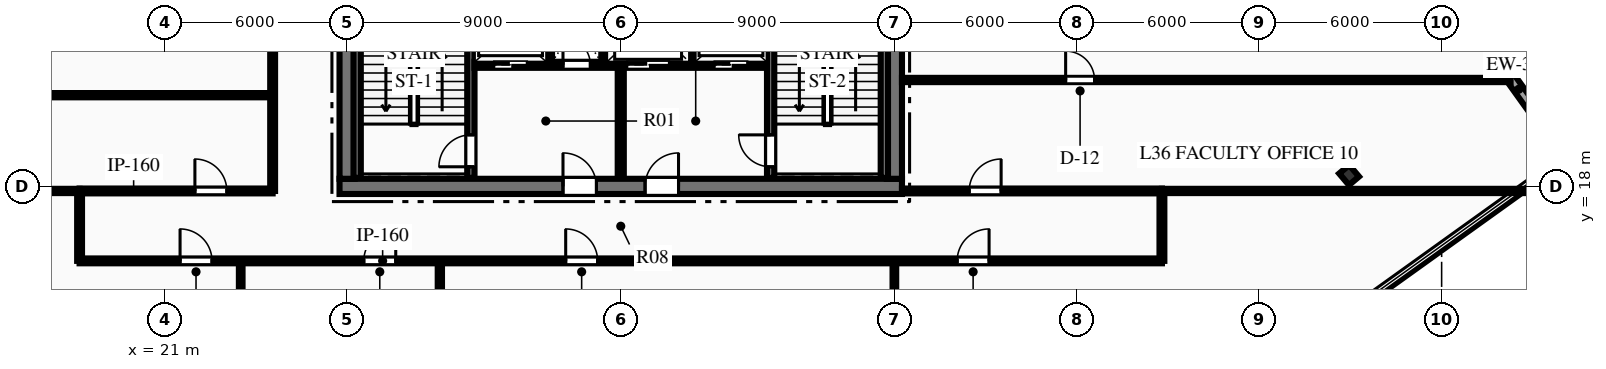
"""IFC4 building model, lengths in metres.
Left out: names, types, materials, properties, quantities, classifications, styles, units other than length and angle.
Written with IfcOpenShell. Run it as: python <this file> out.ifc"""

import sys

from ifc_helpers import new_model, si_unit, direction, frame, frame_2d, origin, origin_2d, place, context, subcontext, project, spatial, rectangle, i_section, extrude, element, fill, save


model = new_model("IFC4")
c1 = context("Model", 3, precision=1e-05, world=origin(), true_north=direction((0.0, 1.0)))
c2 = subcontext(c1, "Body", "Model", "MODEL_VIEW")
j1 = project(units=[si_unit("LENGTHUNIT", "METRE"), si_unit("PLANEANGLEUNIT", "RADIAN")], contexts=[c1])
p1 = place(None, origin())
s1 = spatial("IfcSite", under=j1, at=p1, CompositionType="ELEMENT")
p2 = place(p1, origin())
s2 = spatial("IfcBuilding", under=s1, at=p2, CompositionType="ELEMENT")
p3 = place(p2, frame((0.0, 0.0, 148.2)))
s3 = spatial("IfcBuildingStorey", under=s2, at=p3, CompositionType="ELEMENT", Elevation=148.2)
p4 = place(p3, frame((26.75, 18.0, 0.0), z_axis=(0.0, 0.0, 1.0), x_axis=(1.0, 0.0, 0.0)))
e1 = element("IfcWall", 1, at=p4, inside=s3, PredefinedType="SHEAR", context=c2, shape_type="SweptSolid", body=[
    extrude(rectangle(XDim=18.5, YDim=0.5, at=frame_2d((9.25, 0.0))), origin(), (0.0, 0.0, 1.0), 3.75),
])
p5 = place(p4, frame((7.35, 0.0, 0.0)))
e2 = element("IfcOpeningElement", 2, at=p5, cuts=e1, PredefinedType="OPENING", context=c2, shape_type="SweptSolid", body=[
    extrude(rectangle(XDim=1.1, YDim=2.15, at=frame_2d((0.55, 1.075))), frame((0.0, 0.26, 0.0), z_axis=(0.0, -1.0, 0.0), x_axis=(1.0, 0.0, 0.0)), (0.0, 0.0, 1.0), 0.52),
])
p6 = place(p4, frame((10.05, 0.0, 0.0)))
e3 = element("IfcOpeningElement", 3, at=p6, cuts=e1, PredefinedType="OPENING", context=c2, shape_type="SweptSolid", body=[
    extrude(rectangle(XDim=1.1, YDim=2.15, at=frame_2d((0.55, 1.075))), frame((0.0, 0.26, 0.0), z_axis=(0.0, -1.0, 0.0), x_axis=(1.0, 0.0, 0.0)), (0.0, 0.0, 1.0), 0.52),
])
p7 = place(p3, frame((27.0, 18.25, 0.0), z_axis=(0.0, 0.0, 1.0), x_axis=(0.0, 1.0, 0.0)))
e4 = element("IfcWall", 4, at=p7, inside=s3, PredefinedType="SHEAR", context=c2, shape_type="SweptSolid", body=[
    extrude(rectangle(XDim=15.5, YDim=0.5, at=frame_2d((7.75, 0.0))), origin(), (0.0, 0.0, 1.0), 3.75),
])
p8 = place(p7, frame((9.99, 0.0, 0.0)))
e5 = element("IfcOpeningElement", 5, at=p8, cuts=e4, PredefinedType="OPENING", context=c2, shape_type="SweptSolid", body=[
    extrude(rectangle(XDim=1.4, YDim=2.2, at=frame_2d((0.7, 1.1))), frame((0.0, 0.26, 0.0), z_axis=(0.0, -1.0, 0.0), x_axis=(1.0, 0.0, 0.0)), (0.0, 0.0, 1.0), 0.52),
])
p9 = place(p3, frame((45.0, 18.25, 0.0), z_axis=(0.0, 0.0, 1.0), x_axis=(0.0, 1.0, 0.0)))
e6 = element("IfcWall", 6, at=p9, inside=s3, PredefinedType="SHEAR", context=c2, shape_type="SweptSolid", body=[
    extrude(rectangle(XDim=15.5, YDim=0.5, at=frame_2d((7.75, 0.0))), origin(), (0.0, 0.0, 1.0), 3.75),
])
p10 = place(p9, frame((9.99, 0.0, 0.0)))
e7 = element("IfcOpeningElement", 7, at=p10, cuts=e6, PredefinedType="OPENING", context=c2, shape_type="SweptSolid", body=[
    extrude(rectangle(XDim=1.4, YDim=2.2, at=frame_2d((0.7, 1.1))), frame((0.0, 0.26, 0.0), z_axis=(0.0, -1.0, 0.0), x_axis=(1.0, 0.0, 0.0)), (0.0, 0.0, 1.0), 0.52),
])
p11 = place(p3, frame((31.07, 18.28, 0.0), z_axis=(0.0, 0.0, 1.0), x_axis=(0.0, 1.0, 0.0)))
e8 = element("IfcWall", 8, at=p11, inside=s3, PredefinedType="SHEAR", context=c2, shape_type="SweptSolid", body=[
    extrude(rectangle(XDim=8.26, YDim=0.24, at=frame_2d((4.13, 0.0))), origin(), (0.0, 0.0, 1.0), 3.75),
])
p12 = place(p11, frame((0.365, 0.0, 0.0)))
e9 = element("IfcOpeningElement", 9, at=p12, cuts=e8, PredefinedType="OPENING", context=c2, shape_type="SweptSolid", body=[
    extrude(rectangle(XDim=1.05, YDim=2.15, at=frame_2d((0.525, 1.075))), frame((0.0, 0.13, 0.0), z_axis=(0.0, -1.0, 0.0), x_axis=(1.0, 0.0, 0.0)), (0.0, 0.0, 1.0), 0.26),
])
p13 = place(p3, frame((27.33, 18.28, 0.0), z_axis=(0.0, 0.0, 1.0), x_axis=(0.0, 1.0, 0.0)))
e10 = element("IfcWall", 10, at=p13, inside=s3, PredefinedType="SHEAR", context=c2, shape_type="SweptSolid", body=[
    extrude(rectangle(XDim=8.26, YDim=0.24, at=frame_2d((4.13, 0.0))), origin(), (0.0, 0.0, 1.0), 3.75),
])
p14 = place(p3, frame((40.93, 18.28, 0.0), z_axis=(0.0, 0.0, 1.0), x_axis=(0.0, 1.0, 0.0)))
e11 = element("IfcWall", 11, at=p14, inside=s3, PredefinedType="SHEAR", context=c2, shape_type="SweptSolid", body=[
    extrude(rectangle(XDim=8.26, YDim=0.24, at=frame_2d((4.13, 0.0))), origin(), (0.0, 0.0, 1.0), 3.75),
])
p15 = place(p14, frame((0.365, 0.0, 0.0)))
e12 = element("IfcOpeningElement", 12, at=p15, cuts=e11, PredefinedType="OPENING", context=c2, shape_type="SweptSolid", body=[
    extrude(rectangle(XDim=1.05, YDim=2.15, at=frame_2d((0.525, 1.075))), frame((0.0, 0.13, 0.0), z_axis=(0.0, -1.0, 0.0), x_axis=(1.0, 0.0, 0.0)), (0.0, 0.0, 1.0), 0.26),
])
p16 = place(p3, frame((44.67, 18.28, 0.0), z_axis=(0.0, 0.0, 1.0), x_axis=(0.0, 1.0, 0.0)))
e13 = element("IfcWall", 13, at=p16, inside=s3, PredefinedType="SHEAR", context=c2, shape_type="SweptSolid", body=[
    extrude(rectangle(XDim=8.26, YDim=0.24, at=frame_2d((4.13, 0.0))), origin(), (0.0, 0.0, 1.0), 3.75),
])
p17 = place(p3, frame((59.956, 18.373, 0.0), z_axis=(0.0, 0.0, 1.0), x_axis=(0.763232469783, 0.646123979643, 0.0)))
e14 = element("IfcColumn", 14, at=p17, inside=s3, PredefinedType="COLUMN", context=c2, shape_type="SweptSolid", body=[
    extrude(i_section(OverallWidth=0.432, OverallDepth=0.498, WebThickness=0.056, FlangeThickness=0.089, at=origin_2d()), origin(), (0.0, 0.0, 1.0), 3.75),
])
p18 = place(p3, frame((64.884, 22.104, 0.0), z_axis=(0.0, 0.0, 1.0), x_axis=(0.582813264105, -0.812606115645, 0.0)))
e15 = element("IfcWall", 15, at=p18, inside=s3, PredefinedType="STANDARD", context=c2, shape_type="SweptSolid", body=[
    extrude(rectangle(XDim=4.0, YDim=0.32, at=frame_2d((2.0, 0.0))), origin(), (0.0, 0.0, 1.0), 3.46),
])
p19 = place(p3, frame((68.134, 24.436, 0.0), z_axis=(0.0, 0.0, 1.0), x_axis=(-0.812606115645, -0.582813264105, 0.0)))
e16 = element("IfcWall", 16, at=p19, inside=s3, PredefinedType="STANDARD", context=c2, shape_type="SweptSolid", body=[
    extrude(rectangle(XDim=4.0, YDim=0.32, at=frame_2d((2.0, 0.0))), origin(), (0.0, 0.0, 1.0), 3.46),
])
p20 = place(p19, frame((1.275, 0.0, 0.85)))
e17 = element("IfcOpeningElement", 17, at=p20, cuts=e16, PredefinedType="OPENING", context=c2, shape_type="SweptSolid", body=[
    extrude(rectangle(XDim=1.45, YDim=2.05, at=frame_2d((0.725, 1.025))), frame((0.0, 0.17, 0.0), z_axis=(0.0, -1.0, 0.0), x_axis=(1.0, 0.0, 0.0)), (0.0, 0.0, 1.0), 0.34),
])
p21 = place(p3, frame((36.0, 18.28, 0.0), z_axis=(0.0, 0.0, 1.0), x_axis=(0.0, 1.0, 0.0)))
e18 = element("IfcWall", 18, at=p21, inside=s3, PredefinedType="PARTITIONING", context=c2, shape_type="SweptSolid", body=[
    extrude(rectangle(XDim=3.77, YDim=0.2, at=frame_2d((1.885, 0.0))), origin(), (0.0, 0.0, 1.0), 3.46),
])
p22 = place(p3, frame((31.19, 22.0, 0.0), z_axis=(0.0, 0.0, 1.0), x_axis=(1.0, 0.0, 0.0)))
e19 = element("IfcWall", 19, at=p22, inside=s3, PredefinedType="PARTITIONING", context=c2, shape_type="SweptSolid", body=[
    extrude(rectangle(XDim=4.69, YDim=0.2, at=frame_2d((2.345, 0.0))), origin(), (0.0, 0.0, 1.0), 3.46),
])
p23 = place(p22, frame((2.91, 0.0, 0.0)))
e20 = element("IfcOpeningElement", 20, at=p23, cuts=e19, PredefinedType="OPENING", context=c2, shape_type="SweptSolid", body=[
    extrude(rectangle(XDim=0.9, YDim=2.15, at=frame_2d((0.45, 1.075))), frame((0.0, 0.11, 0.0), z_axis=(0.0, -1.0, 0.0), x_axis=(1.0, 0.0, 0.0)), (0.0, 0.0, 1.0), 0.22),
])
p24 = place(p22, frame((0.635, 0.0, 0.0)))
e21 = element("IfcOpeningElement", 21, at=p24, cuts=e19, PredefinedType="OPENING", context=c2, shape_type="SweptSolid", body=[
    extrude(rectangle(XDim=1.1, YDim=2.15, at=frame_2d((0.55, 1.075))), frame((0.0, 0.11, 0.0), z_axis=(0.0, -1.0, 0.0), x_axis=(1.0, 0.0, 0.0)), (0.0, 0.0, 1.0), 0.22),
])
p25 = place(p3, frame((36.12, 22.0, 0.0), z_axis=(0.0, 0.0, 1.0), x_axis=(1.0, 0.0, 0.0)))
e22 = element("IfcWall", 22, at=p25, inside=s3, PredefinedType="PARTITIONING", context=c2, shape_type="SweptSolid", body=[
    extrude(rectangle(XDim=4.69, YDim=0.2, at=frame_2d((2.345, 0.0))), origin(), (0.0, 0.0, 1.0), 3.46),
])
p26 = place(p25, frame((2.955, 0.0, 0.0)))
e23 = element("IfcOpeningElement", 23, at=p26, cuts=e22, PredefinedType="OPENING", context=c2, shape_type="SweptSolid", body=[
    extrude(rectangle(XDim=1.1, YDim=2.15, at=frame_2d((0.55, 1.075))), frame((0.0, 0.11, 0.0), z_axis=(0.0, -1.0, 0.0), x_axis=(1.0, 0.0, 0.0)), (0.0, 0.0, 1.0), 0.22),
])
p27 = place(p25, frame((0.08, 0.0, 0.0)))
e24 = element("IfcOpeningElement", 24, at=p27, cuts=e22, PredefinedType="OPENING", context=c2, shape_type="SweptSolid", body=[
    extrude(rectangle(XDim=1.4, YDim=2.2, at=frame_2d((0.7, 1.1))), frame((0.0, 0.11, 0.0), z_axis=(0.0, -1.0, 0.0), x_axis=(1.0, 0.0, 0.0)), (0.0, 0.0, 1.0), 0.22),
])
for number, where, z_axis, x_axis in (
    (25, (33.65, 22.05, 0.0), (0.0, 0.0, 1.0), (0.0, 1.0, 0.0)),
    (26, (35.45, 22.05, 0.0), (0.0, 0.0, 1.0), (0.0, 1.0, 0.0)),
    (27, (38.35, 22.05, 0.0), (0.0, 0.0, 1.0), (0.0, 1.0, 0.0)),
):
    element("IfcWall", number, at=place(p3, frame(where, z_axis=z_axis, x_axis=x_axis)), inside=s3, PredefinedType="PARTITIONING", context=c2, shape_type="SweptSolid", body=[
        extrude(rectangle(XDim=2.6, YDim=0.18, at=frame_2d((1.3, 0.0))), origin(), (0.0, 0.0, 1.0), 3.46),
    ])
p28 = place(p3, frame((18.2, 15.55, 0.0), z_axis=(0.0, 0.0, 1.0), x_axis=(1.0, 0.0, 0.0)))
e28 = element("IfcWall", 28, at=p28, inside=s3, PredefinedType="PARTITIONING", context=c2, shape_type="SweptSolid", body=[
    extrude(rectangle(XDim=35.6, YDim=0.16, at=frame_2d((17.8, 0.0))), origin(), (0.0, 0.0, 1.0), 3.46),
])
p29 = place(p28, frame((3.305, 0.0, 0.0)))
e29 = element("IfcOpeningElement", 29, at=p29, cuts=e28, PredefinedType="OPENING", context=c2, shape_type="SweptSolid", body=[
    extrude(rectangle(XDim=1.05, YDim=2.15, at=frame_2d((0.525, 1.075))), frame((0.0, 0.09, 0.0), z_axis=(0.0, -1.0, 0.0), x_axis=(1.0, 0.0, 0.0)), (0.0, 0.0, 1.0), 0.18),
])
p30 = place(p28, frame((9.349, 0.0, 0.0)))
e30 = element("IfcOpeningElement", 30, at=p30, cuts=e28, PredefinedType="OPENING", context=c2, shape_type="SweptSolid", body=[
    extrude(rectangle(XDim=1.05, YDim=2.15, at=frame_2d((0.525, 1.075))), frame((0.0, 0.09, 0.0), z_axis=(0.0, -1.0, 0.0), x_axis=(1.0, 0.0, 0.0)), (0.0, 0.0, 1.0), 0.18),
])
p31 = place(p28, frame((15.989, 0.0, 0.0)))
e31 = element("IfcOpeningElement", 31, at=p31, cuts=e28, PredefinedType="OPENING", context=c2, shape_type="SweptSolid", body=[
    extrude(rectangle(XDim=1.05, YDim=2.15, at=frame_2d((0.525, 1.075))), frame((0.0, 0.09, 0.0), z_axis=(0.0, -1.0, 0.0), x_axis=(1.0, 0.0, 0.0)), (0.0, 0.0, 1.0), 0.18),
])
p32 = place(p28, frame((28.865, 0.0, 0.0)))
e32 = element("IfcOpeningElement", 32, at=p32, cuts=e28, PredefinedType="OPENING", context=c2, shape_type="SweptSolid", body=[
    extrude(rectangle(XDim=1.05, YDim=2.15, at=frame_2d((0.525, 1.075))), frame((0.0, 0.09, 0.0), z_axis=(0.0, -1.0, 0.0), x_axis=(1.0, 0.0, 0.0)), (0.0, 0.0, 1.0), 0.18),
])
p33 = place(p3, frame((18.2, 17.85, 0.0), z_axis=(0.0, 0.0, 1.0), x_axis=(1.0, 0.0, 0.0)))
e33 = element("IfcWall", 33, at=p33, inside=s3, PredefinedType="PARTITIONING", context=c2, shape_type="SweptSolid", body=[
    extrude(rectangle(XDim=6.35, YDim=0.16, at=frame_2d((3.175, 0.0))), origin(), (0.0, 0.0, 1.0), 3.46),
])
p34 = place(p33, frame((3.793, 0.0, 0.0)))
e34 = element("IfcOpeningElement", 34, at=p34, cuts=e33, PredefinedType="OPENING", context=c2, shape_type="SweptSolid", body=[
    extrude(rectangle(XDim=1.05, YDim=2.15, at=frame_2d((0.525, 1.075))), frame((0.0, 0.09, 0.0), z_axis=(0.0, -1.0, 0.0), x_axis=(1.0, 0.0, 0.0)), (0.0, 0.0, 1.0), 0.18),
])
p35 = place(p3, frame((45.25, 17.85, 0.0), z_axis=(0.0, 0.0, 1.0), x_axis=(1.0, 0.0, 0.0)))
e35 = element("IfcWall", 35, at=p35, inside=s3, PredefinedType="PARTITIONING", context=c2, shape_type="SweptSolid", body=[
    extrude(rectangle(XDim=8.55, YDim=0.16, at=frame_2d((4.275, 0.0))), origin(), (0.0, 0.0, 1.0), 2.998),
])
p36 = place(p35, frame((2.211, 0.0, 0.0)))
e36 = element("IfcOpeningElement", 36, at=p36, cuts=e35, PredefinedType="OPENING", context=c2, shape_type="SweptSolid", body=[
    extrude(rectangle(XDim=1.05, YDim=2.15, at=frame_2d((0.525, 1.075))), frame((0.0, 0.09, 0.0), z_axis=(0.0, -1.0, 0.0), x_axis=(1.0, 0.0, 0.0)), (0.0, 0.0, 1.0), 0.18),
])
p37 = place(p3, frame((24.55, 17.85, 0.0), z_axis=(0.0, 0.0, 1.0), x_axis=(0.0, 1.0, 0.0)))
e37 = element("IfcWall", 37, at=p37, inside=s3, PredefinedType="PARTITIONING", context=c2, shape_type="SweptSolid", body=[
    extrude(rectangle(XDim=16.3, YDim=0.16, at=frame_2d((8.15, 0.0))), origin(), (0.0, 0.0, 1.0), 3.46),
])
p38 = place(p37, frame((6.375, 0.0, 0.0)))
e38 = element("IfcOpeningElement", 38, at=p38, cuts=e37, PredefinedType="OPENING", context=c2, shape_type="SweptSolid", body=[
    extrude(rectangle(XDim=1.05, YDim=2.15, at=frame_2d((0.525, 1.075))), frame((0.0, 0.09, 0.0), z_axis=(0.0, -1.0, 0.0), x_axis=(1.0, 0.0, 0.0)), (0.0, 0.0, 1.0), 0.18),
])
for number, where, z_axis, x_axis in (
    (39, (18.2, 15.55, 0.0), (0.0, 0.0, 1.0), (0.0, 1.0, 0.0)),
    (40, (53.8, 15.55, 0.0), (0.0, 0.0, 1.0), (0.0, 1.0, 0.0)),
):
    element("IfcWall", number, at=place(p3, frame(where, z_axis=z_axis, x_axis=x_axis)), inside=s3, PredefinedType="PARTITIONING", context=c2, shape_type="SweptSolid", body=[
        extrude(rectangle(XDim=2.3, YDim=0.16, at=frame_2d((1.15, 0.0))), origin(), (0.0, 0.0, 1.0), 3.46),
    ])
p39 = place(p3, frame((10.883, 17.85, 0.0), z_axis=(0.0, 0.0, 1.0), x_axis=(1.0, 0.0, 0.0)))
e41 = element("IfcWall", 41, at=p39, inside=s3, PredefinedType="PARTITIONING", context=c2, shape_type="SweptSolid", body=[
    extrude(rectangle(XDim=7.317, YDim=0.14, at=frame_2d((3.658, 0.0))), origin(), (0.0, 0.0, 1.0), 3.46),
])
p40 = place(p3, frame((53.8, 17.85, 0.0), z_axis=(0.0, 0.0, 1.0), x_axis=(1.0, 0.0, 0.0)))
e42 = element("IfcWall", 42, at=p40, inside=s3, PredefinedType="PARTITIONING", context=c2, shape_type="SweptSolid", body=[
    extrude(rectangle(XDim=11.947, YDim=0.14, at=frame_2d((5.973, 0.0))), origin(), (0.0, 0.0, 1.0), 3.46),
])
p41 = place(p3, frame((23.5, 0.259, 0.0), z_axis=(0.0, 0.0, 1.0), x_axis=(0.0, 1.0, 0.0)))
e43 = element("IfcWall", 43, at=p41, inside=s3, PredefinedType="PARTITIONING", context=c2, shape_type="SweptSolid", body=[
    extrude(rectangle(XDim=15.291, YDim=0.12, at=frame_2d((7.646, 0.0))), origin(), (0.0, 0.0, 1.0), 3.46),
])
p42 = place(p3, frame((30.05, -2.831, 0.0), z_axis=(0.0, 0.0, 1.0), x_axis=(0.0, 1.0, 0.0)))
e44 = element("IfcWall", 44, at=p42, inside=s3, PredefinedType="PARTITIONING", context=c2, shape_type="SweptSolid", body=[
    extrude(rectangle(XDim=18.381, YDim=0.14, at=frame_2d((9.19, 0.0))), origin(), (0.0, 0.0, 1.0), 3.46),
])
p43 = place(p3, frame((45.0, 2.969, 0.0), z_axis=(0.0, 0.0, 1.0), x_axis=(0.0, 1.0, 0.0)))
e45 = element("IfcWall", 45, at=p43, inside=s3, PredefinedType="PARTITIONING", context=c2, shape_type="SweptSolid", body=[
    extrude(rectangle(XDim=12.581, YDim=0.12, at=frame_2d((6.29, 0.0))), origin(), (0.0, 0.0, 1.0), 3.46),
])
p44 = place(p3, frame((8.624, 21.0, 0.0), z_axis=(0.0, 0.0, 1.0), x_axis=(1.0, 0.0, 0.0)))
e46 = element("IfcWall", 46, at=p44, inside=s3, PredefinedType="PARTITIONING", context=c2, shape_type="SweptSolid", body=[
    extrude(rectangle(XDim=15.926, YDim=0.14, at=frame_2d((7.963, 0.0))), origin(), (0.0, 0.0, 1.0), 2.839),
])
p45 = place(p3, frame((45.25, 21.5, 0.0), z_axis=(0.0, 0.0, 1.0), x_axis=(1.0, 0.0, 0.0)))
e47 = element("IfcWall", 47, at=p45, inside=s3, PredefinedType="PARTITIONING", context=c2, shape_type="SweptSolid", body=[
    extrude(rectangle(XDim=20.018, YDim=0.14, at=frame_2d((10.009, 0.0))), origin(), (0.0, 0.0, 1.0), 3.46),
])
p46 = place(p45, frame((5.383, 0.0, 0.0)))
e48 = element("IfcOpeningElement", 48, at=p46, cuts=e47, PredefinedType="OPENING", context=c2, shape_type="SweptSolid", body=[
    extrude(rectangle(XDim=0.95, YDim=2.15, at=frame_2d((0.475, 1.075))), frame((0.0, 0.08, 0.0), z_axis=(0.0, -1.0, 0.0), x_axis=(1.0, 0.0, 0.0)), (0.0, 0.0, 1.0), 0.16),
])
p47 = place(p12, origin())
e49 = element("IfcDoor", 49, at=p47, inside=s3, OperationType="SINGLE_SWING_LEFT", PredefinedType="DOOR", context=c2, shape_type="SweptSolid", body=[
    extrude(rectangle(XDim=1.05, YDim=2.15, at=frame_2d((0.525, 1.075))), frame((0.0, 0.025, 0.0), z_axis=(0.0, -1.0, 0.0), x_axis=(1.0, 0.0, 0.0)), (0.0, 0.0, 1.0), 0.05),
])
fill(e9, e49)
p48 = place(p15, origin())
e50 = element("IfcDoor", 50, at=p48, inside=s3, OperationType="SINGLE_SWING_RIGHT", PredefinedType="DOOR", context=c2, shape_type="SweptSolid", body=[
    extrude(rectangle(XDim=1.05, YDim=2.15, at=frame_2d((0.525, 1.075))), frame((0.0, 0.025, 0.0), z_axis=(0.0, -1.0, 0.0), x_axis=(1.0, 0.0, 0.0)), (0.0, 0.0, 1.0), 0.05),
])
fill(e12, e50)
p49 = place(p5, origin())
e51 = element("IfcDoor", 51, at=p49, inside=s3, OperationType="SINGLE_SWING_LEFT", PredefinedType="DOOR", context=c2, shape_type="SweptSolid", body=[
    extrude(rectangle(XDim=1.1, YDim=2.15, at=frame_2d((0.55, 1.075))), frame((0.0, 0.025, 0.0), z_axis=(0.0, -1.0, 0.0), x_axis=(1.0, 0.0, 0.0)), (0.0, 0.0, 1.0), 0.05),
])
fill(e2, e51)
p50 = place(p6, origin())
e52 = element("IfcDoor", 52, at=p50, inside=s3, OperationType="SINGLE_SWING_RIGHT", PredefinedType="DOOR", context=c2, shape_type="SweptSolid", body=[
    extrude(rectangle(XDim=1.1, YDim=2.15, at=frame_2d((0.55, 1.075))), frame((0.0, 0.025, 0.0), z_axis=(0.0, -1.0, 0.0), x_axis=(1.0, 0.0, 0.0)), (0.0, 0.0, 1.0), 0.05),
])
fill(e3, e52)
p51 = place(p23, origin())
e53 = element("IfcDoor", 53, at=p51, inside=s3, OperationType="SINGLE_SWING_LEFT", PredefinedType="DOOR", context=c2, shape_type="SweptSolid", body=[
    extrude(rectangle(XDim=0.9, YDim=2.15, at=frame_2d((0.45, 1.075))), frame((0.0, 0.025, 0.0), z_axis=(0.0, -1.0, 0.0), x_axis=(1.0, 0.0, 0.0)), (0.0, 0.0, 1.0), 0.05),
])
fill(e20, e53)
p52 = place(p29, origin())
e54 = element("IfcDoor", 54, at=p52, inside=s3, OperationType="SINGLE_SWING_LEFT", PredefinedType="DOOR", context=c2, shape_type="SweptSolid", body=[
    extrude(rectangle(XDim=1.05, YDim=2.15, at=frame_2d((0.525, 1.075))), frame((0.0, 0.025, 0.0), z_axis=(0.0, -1.0, 0.0), x_axis=(1.0, 0.0, 0.0)), (0.0, 0.0, 1.0), 0.05),
])
fill(e29, e54)
p53 = place(p30, origin())
e55 = element("IfcDoor", 55, at=p53, inside=s3, OperationType="SINGLE_SWING_RIGHT", PredefinedType="DOOR", context=c2, shape_type="SweptSolid", body=[
    extrude(rectangle(XDim=1.05, YDim=2.15, at=frame_2d((0.525, 1.075))), frame((0.0, 0.025, 0.0), z_axis=(0.0, -1.0, 0.0), x_axis=(1.0, 0.0, 0.0)), (0.0, 0.0, 1.0), 0.05),
])
fill(e30, e55)
p54 = place(p31, origin())
e56 = element("IfcDoor", 56, at=p54, inside=s3, OperationType="SINGLE_SWING_LEFT", PredefinedType="DOOR", context=c2, shape_type="SweptSolid", body=[
    extrude(rectangle(XDim=1.05, YDim=2.15, at=frame_2d((0.525, 1.075))), frame((0.0, 0.025, 0.0), z_axis=(0.0, -1.0, 0.0), x_axis=(1.0, 0.0, 0.0)), (0.0, 0.0, 1.0), 0.05),
])
fill(e31, e56)
p55 = place(p32, origin())
e57 = element("IfcDoor", 57, at=p55, inside=s3, OperationType="SINGLE_SWING_RIGHT", PredefinedType="DOOR", context=c2, shape_type="SweptSolid", body=[
    extrude(rectangle(XDim=1.05, YDim=2.15, at=frame_2d((0.525, 1.075))), frame((0.0, 0.025, 0.0), z_axis=(0.0, -1.0, 0.0), x_axis=(1.0, 0.0, 0.0)), (0.0, 0.0, 1.0), 0.05),
])
fill(e32, e57)
p56 = place(p34, origin())
e58 = element("IfcDoor", 58, at=p56, inside=s3, OperationType="SINGLE_SWING_LEFT", PredefinedType="DOOR", context=c2, shape_type="SweptSolid", body=[
    extrude(rectangle(XDim=1.05, YDim=2.15, at=frame_2d((0.525, 1.075))), frame((0.0, 0.025, 0.0), z_axis=(0.0, -1.0, 0.0), x_axis=(1.0, 0.0, 0.0)), (0.0, 0.0, 1.0), 0.05),
])
fill(e34, e58)
p57 = place(p36, origin())
e59 = element("IfcDoor", 59, at=p57, inside=s3, OperationType="SINGLE_SWING_RIGHT", PredefinedType="DOOR", context=c2, shape_type="SweptSolid", body=[
    extrude(rectangle(XDim=1.05, YDim=2.15, at=frame_2d((0.525, 1.075))), frame((0.0, 0.025, 0.0), z_axis=(0.0, -1.0, 0.0), x_axis=(1.0, 0.0, 0.0)), (0.0, 0.0, 1.0), 0.05),
])
fill(e36, e59)
p58 = place(p46, origin())
e60 = element("IfcDoor", 60, at=p58, inside=s3, OperationType="SINGLE_SWING_LEFT", PredefinedType="DOOR", context=c2, shape_type="SweptSolid", body=[
    extrude(rectangle(XDim=0.95, YDim=2.15, at=frame_2d((0.475, 1.075))), frame((0.0, 0.025, 0.0), z_axis=(0.0, -1.0, 0.0), x_axis=(1.0, 0.0, 0.0)), (0.0, 0.0, 1.0), 0.05),
])
fill(e48, e60)
p59 = place(p24, origin())
e61 = element("IfcDoor", 61, at=p59, inside=s3, OperationType="SLIDING_TO_LEFT", PredefinedType="DOOR", context=c2, shape_type="SweptSolid", body=[
    extrude(rectangle(XDim=1.1, YDim=2.15, at=frame_2d((0.55, 1.075))), frame((0.0, 0.025, 0.0), z_axis=(0.0, -1.0, 0.0), x_axis=(1.0, 0.0, 0.0)), (0.0, 0.0, 1.0), 0.05),
])
fill(e21, e61)
p60 = place(p26, origin())
e62 = element("IfcDoor", 62, at=p60, inside=s3, OperationType="SLIDING_TO_LEFT", PredefinedType="DOOR", context=c2, shape_type="SweptSolid", body=[
    extrude(rectangle(XDim=1.1, YDim=2.15, at=frame_2d((0.55, 1.075))), frame((0.0, 0.025, 0.0), z_axis=(0.0, -1.0, 0.0), x_axis=(1.0, 0.0, 0.0)), (0.0, 0.0, 1.0), 0.05),
])
fill(e23, e62)
p61 = place(p27, origin())
e63 = element("IfcDoor", 63, at=p61, inside=s3, OperationType="SLIDING_TO_LEFT", PredefinedType="DOOR", context=c2, shape_type="SweptSolid", body=[
    extrude(rectangle(XDim=1.4, YDim=2.2, at=frame_2d((0.7, 1.1))), frame((0.0, 0.025, 0.0), z_axis=(0.0, -1.0, 0.0), x_axis=(1.0, 0.0, 0.0)), (0.0, 0.0, 1.0), 0.05),
])
fill(e24, e63)
save(model, sys.argv[1])
